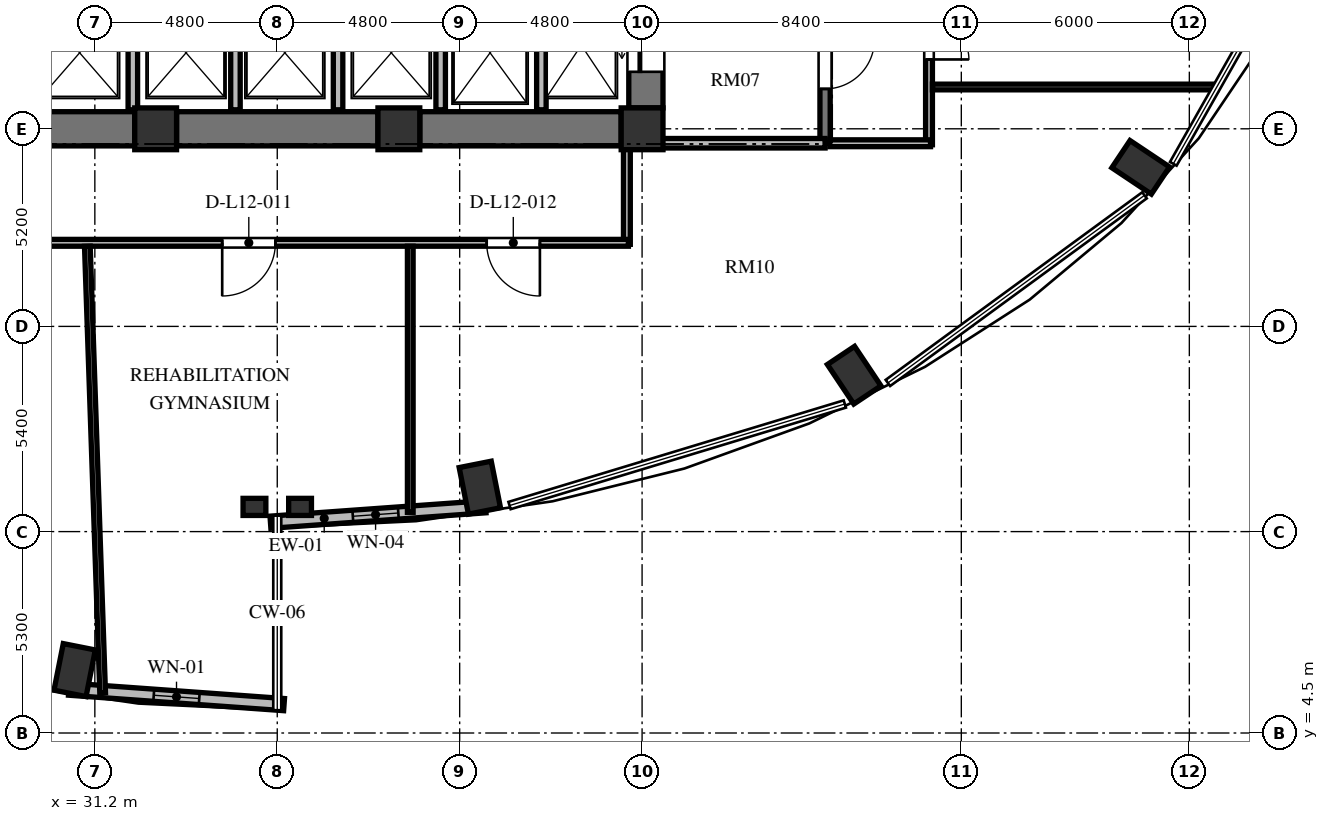
"""IFC4 building model, lengths in metres.
Left out: names, types, materials, properties, quantities, classifications, styles, units other than length and angle.
Written with IfcOpenShell. Run it as: python <this file> out.ifc"""

import sys

from ifc_helpers import new_model, si_unit, direction, frame, frame_2d, origin, origin_2d, place, context, subcontext, project, spatial, rectangle, extrude, element, fill, save


model = new_model("IFC4")
c1 = context("Model", 3, precision=1e-05, world=origin(), true_north=direction((0.0, 1.0)))
c2 = subcontext(c1, "Body", "Model", "MODEL_VIEW")
j1 = project(units=[si_unit("LENGTHUNIT", "METRE"), si_unit("PLANEANGLEUNIT", "RADIAN")], contexts=[c1])
p1 = place(None, origin())
s1 = spatial("IfcSite", under=j1, at=p1, CompositionType="ELEMENT")
p2 = place(p1, origin())
s2 = spatial("IfcBuilding", under=s1, at=p2, CompositionType="ELEMENT")
p3 = place(p2, frame((0.0, 0.0, 50.736)))
s3 = spatial("IfcBuildingStorey", under=s2, at=p3, CompositionType="ELEMENT", Elevation=50.736)
for number, where, z_axis, x_axis in (
    (1, (41.331, 10.956, 0.0), (0.0, 0.0, 1.0), (0.195, -0.981, 0.0)),
    (2, (51.181, 13.916, 0.0), (0.0, 0.0, 1.0), (0.556, -0.831, 0.0)),
    (3, (58.72, 19.386, 0.0), (0.0, 0.0, 1.0), (0.831, -0.556, 0.0)),
    (4, (30.669, 6.156, 0.0), (0.0, 0.0, 1.0), (-0.195, -0.981, 0.0)),
):
    element("IfcColumn", number, at=place(p3, frame(where, z_axis=z_axis, x_axis=x_axis)), inside=s3, PredefinedType="COLUMN", context=c2, shape_type="SweptSolid", body=[
        extrude(rectangle(XDim=1.25, YDim=0.86, at=origin_2d()), origin(), (0.0, 0.0, 1.0), 3.648),
    ])
for number, where, z_axis, x_axis in (
    (5, (32.8, 20.4, 0.0), (0.0, 0.0, 1.0), (1.0, 0.0, 0.0)),
    (6, (39.2, 20.4, 0.0), (0.0, 0.0, 1.0), (1.0, 0.0, 0.0)),
    (7, (45.6, 20.4, 0.0), (0.0, 0.0, 1.0), (1.0, 0.0, 0.0)),
):
    element("IfcColumn", number, at=place(p3, frame(where, z_axis=z_axis, x_axis=x_axis)), inside=s3, PredefinedType="COLUMN", context=c2, shape_type="SweptSolid", body=[
        extrude(rectangle(XDim=1.1, YDim=1.1, at=origin_2d()), origin(), (0.0, 0.0, 1.0), 3.648),
    ])
for number, where, z_axis, x_axis in (
    (8, (35.4, 10.45, 0.0), (0.0, 0.0, 1.0), (1.0, 0.0, 0.0)),
    (9, (36.6, 10.45, 0.0), (0.0, 0.0, 1.0), (1.0, 0.0, 0.0)),
):
    element("IfcColumn", number, at=place(p3, frame(where, z_axis=z_axis, x_axis=x_axis)), inside=s3, PredefinedType="PILASTER", context=c2, shape_type="SweptSolid", body=[
        extrude(rectangle(XDim=0.6, YDim=0.45, at=origin_2d()), origin(), (0.0, 0.0, 1.0), 3.648),
    ])
p4 = place(p3, frame((45.7, 20.95, 0.0), z_axis=(0.0, 0.0, 1.0), x_axis=(0.0, 1.0, 0.0)))
e10 = element("IfcWall", 10, at=p4, inside=s3, PredefinedType="SHEAR", context=c2, shape_type="SweptSolid", body=[
    extrude(rectangle(XDim=14.1, YDim=0.9, at=frame_2d((7.05, 0.0))), origin(), (0.0, 0.0, 1.0), 3.648),
])
p5 = place(p4, frame((11.75, 0.0, 0.0)))
e11 = element("IfcOpeningElement", 11, at=p5, cuts=e10, PredefinedType="OPENING", context=c2, shape_type="SweptSolid", body=[
    extrude(rectangle(XDim=1.4, YDim=2.3, at=frame_2d((0.7, 1.15))), frame((0.0, 0.46, 0.0), z_axis=(0.0, -1.0, 0.0), x_axis=(1.0, 0.0, 0.0)), (0.0, 0.0, 1.0), 0.92),
])
p6 = place(p4, frame((0.95, 0.0, 0.0)))
e12 = element("IfcOpeningElement", 12, at=p6, cuts=e10, PredefinedType="OPENING", context=c2, shape_type="SweptSolid", body=[
    extrude(rectangle(XDim=1.4, YDim=2.3, at=frame_2d((0.7, 1.15))), frame((0.0, 0.46, 0.0), z_axis=(0.0, -1.0, 0.0), x_axis=(1.0, 0.0, 0.0)), (0.0, 0.0, 1.0), 0.92),
])
p7 = place(p3, frame((26.95, 20.4, 0.0), z_axis=(0.0, 0.0, 1.0), x_axis=(1.0, 0.0, 0.0)))
e13 = element("IfcWall", 13, at=p7, inside=s3, PredefinedType="SHEAR", context=c2, shape_type="SweptSolid", body=[
    extrude(rectangle(XDim=5.3, YDim=0.9, at=frame_2d((2.65, 0.0))), origin(), (0.0, 0.0, 1.0), 3.648),
])
p8 = place(p3, frame((33.35, 20.4, 0.0), z_axis=(0.0, 0.0, 1.0), x_axis=(1.0, 0.0, 0.0)))
e14 = element("IfcWall", 14, at=p8, inside=s3, PredefinedType="SHEAR", context=c2, shape_type="SweptSolid", body=[
    extrude(rectangle(XDim=5.3, YDim=0.9, at=frame_2d((2.65, 0.0))), origin(), (0.0, 0.0, 1.0), 3.648),
])
p9 = place(p3, frame((39.75, 20.4, 0.0), z_axis=(0.0, 0.0, 1.0), x_axis=(1.0, 0.0, 0.0)))
e15 = element("IfcWall", 15, at=p9, inside=s3, PredefinedType="SHEAR", context=c2, shape_type="SweptSolid", body=[
    extrude(rectangle(XDim=5.3, YDim=0.9, at=frame_2d((2.65, 0.0))), origin(), (0.0, 0.0, 1.0), 3.648),
])
p10 = place(p3, frame((35.821, 10.047, 0.0), z_axis=(0.0, 0.0, 1.0), x_axis=(0.997422321809, 0.071754525696, 0.0)))
e16 = element("IfcWall", 16, at=p10, inside=s3, PredefinedType="SOLIDWALL", context=c2, shape_type="SweptSolid", body=[
    extrude(rectangle(XDim=5.675, YDim=0.32, at=frame_2d((2.838, 0.0))), origin(), (0.0, 0.0, 1.0), 3.428),
])
p11 = place(p10, frame((2.174, 0.0, 0.85)))
e17 = element("IfcOpeningElement", 17, at=p11, cuts=e16, PredefinedType="OPENING", context=c2, shape_type="SweptSolid", body=[
    extrude(rectangle(XDim=1.2, YDim=1.8, at=frame_2d((0.6, 0.9))), frame((0.0, 0.17, 0.0), z_axis=(0.0, -1.0, 0.0), x_axis=(1.0, 0.0, 0.0)), (0.0, 0.0, 1.0), 0.34),
])
p12 = place(p3, frame((30.519, 5.654, 0.0), z_axis=(0.0, 0.0, 1.0), x_axis=(0.997421878774, -0.071760683825, 0.0)))
e18 = element("IfcWall", 18, at=p12, inside=s3, PredefinedType="SOLIDWALL", context=c2, shape_type="SweptSolid", body=[
    extrude(rectangle(XDim=5.675, YDim=0.32, at=frame_2d((2.837, 0.0))), origin(), (0.0, 0.0, 1.0), 3.428),
])
p13 = place(p12, frame((2.237, 0.0, 0.85)))
e19 = element("IfcOpeningElement", 19, at=p13, cuts=e18, PredefinedType="OPENING", context=c2, shape_type="SweptSolid", body=[
    extrude(rectangle(XDim=1.2, YDim=2.2, at=frame_2d((0.6, 1.1))), frame((0.0, 0.17, 0.0), z_axis=(0.0, -1.0, 0.0), x_axis=(1.0, 0.0, 0.0)), (0.0, 0.0, 1.0), 0.34),
])
p14 = place(p3, frame((42.95, 20.9, 0.0), z_axis=(0.0, 0.0, 1.0), x_axis=(0.0, 1.0, 0.0)))
e20 = element("IfcWall", 20, at=p14, inside=s3, PredefinedType="SOLIDWALL", context=c2, shape_type="SweptSolid", body=[
    extrude(rectangle(XDim=3.2, YDim=0.25, at=frame_2d((1.6, 0.0))), origin(), (0.0, 0.0, 1.0), 3.428),
])
for number, where, z_axis, x_axis in (
    (21, (32.2, 20.9, 0.0), (0.0, 0.0, 1.0), (0.0, 1.0, 0.0)),
    (22, (34.9, 20.9, 0.0), (0.0, 0.0, 1.0), (0.0, 1.0, 0.0)),
    (23, (37.6, 20.9, 0.0), (0.0, 0.0, 1.0), (0.0, 1.0, 0.0)),
    (24, (40.3, 20.9, 0.0), (0.0, 0.0, 1.0), (0.0, 1.0, 0.0)),
):
    element("IfcWall", number, at=place(p3, frame(where, z_axis=z_axis, x_axis=x_axis)), inside=s3, PredefinedType="SOLIDWALL", context=c2, shape_type="SweptSolid", body=[
        extrude(rectangle(XDim=2.8, YDim=0.25, at=frame_2d((1.4, 0.0))), origin(), (0.0, 0.0, 1.0), 3.428),
    ])
p15 = place(p3, frame((50.415, 35.845, 0.0), z_axis=(0.0, 0.0, 1.0), x_axis=(0.0, -1.0, 0.0)))
e25 = element("IfcWall", 25, at=p15, inside=s3, PredefinedType="SHEAR", context=c2, shape_type="SweptSolid", body=[
    extrude(rectangle(XDim=15.825, YDim=0.27, at=frame_2d((7.913, 0.0))), origin(), (0.0, 0.0, 1.0), 3.648),
])
p16 = place(p15, frame((4.445, 0.0, 0.0)))
e26 = element("IfcOpeningElement", 26, at=p16, cuts=e25, PredefinedType="OPENING", context=c2, shape_type="SweptSolid", body=[
    extrude(rectangle(XDim=1.2, YDim=2.15, at=frame_2d((0.6, 1.075))), frame((0.0, 0.145, 0.0), z_axis=(0.0, -1.0, 0.0), x_axis=(1.0, 0.0, 0.0)), (0.0, 0.0, 1.0), 0.29),
])
p17 = place(p15, frame((1.295, 0.0, 0.0)))
e27 = element("IfcOpeningElement", 27, at=p17, cuts=e25, PredefinedType="OPENING", context=c2, shape_type="SweptSolid", body=[
    extrude(rectangle(XDim=1.3, YDim=2.2, at=frame_2d((0.65, 1.1))), frame((0.0, 0.145, 0.0), z_axis=(0.0, -1.0, 0.0), x_axis=(1.0, 0.0, 0.0)), (0.0, 0.0, 1.0), 0.29),
])
p18 = place(p15, frame((13.095, 0.0, 0.0)))
e28 = element("IfcOpeningElement", 28, at=p18, cuts=e25, PredefinedType="OPENING", context=c2, shape_type="SweptSolid", body=[
    extrude(rectangle(XDim=1.3, YDim=2.2, at=frame_2d((0.65, 1.1))), frame((0.0, 0.145, 0.0), z_axis=(0.0, -1.0, 0.0), x_axis=(1.0, 0.0, 0.0)), (0.0, 0.0, 1.0), 0.29),
])
p19 = place(p3, frame((45.7, 20.02, 0.0), z_axis=(0.0, 0.0, 1.0), x_axis=(1.0, 0.0, 0.0)))
e29 = element("IfcWall", 29, at=p19, inside=s3, PredefinedType="SOLIDWALL", context=c2, shape_type="SweptSolid", body=[
    extrude(rectangle(XDim=4.715, YDim=0.25, at=frame_2d((2.357, 0.0))), origin(), (0.0, 0.0, 1.0), 2.813),
])
p20 = place(p3, frame((53.15, 26.64, 0.0), z_axis=(0.0, 0.0, 1.0), x_axis=(0.0, -1.0, 0.0)))
e30 = element("IfcWall", 30, at=p20, inside=s3, PredefinedType="PARTITIONING", context=c2, shape_type="SweptSolid", body=[
    extrude(rectangle(XDim=6.66, YDim=0.18, at=frame_2d((3.33, 0.0))), origin(), (0.0, 0.0, 1.0), 3.428),
])
p21 = place(p20, frame((3.365, 0.0, 0.0)))
e31 = element("IfcOpeningElement", 31, at=p21, cuts=e30, PredefinedType="OPENING", context=c2, shape_type="SweptSolid", body=[
    extrude(rectangle(XDim=1.05, YDim=2.15, at=frame_2d((0.525, 1.075))), frame((0.0, 0.1, 0.0), z_axis=(0.0, -1.0, 0.0), x_axis=(1.0, 0.0, 0.0)), (0.0, 0.0, 1.0), 0.2),
])
p22 = place(p3, frame((53.19, 20.02, 0.0), z_axis=(0.0, 0.0, 1.0), x_axis=(-1.0, 0.0, 0.0)))
e32 = element("IfcWall", 32, at=p22, inside=s3, PredefinedType="PARTITIONING", context=c2, shape_type="SweptSolid", body=[
    extrude(rectangle(XDim=2.65, YDim=0.18, at=frame_2d((1.325, 0.0))), origin(), (0.0, 0.0, 1.0), 2.813),
])
p23 = place(p3, frame((45.2, 19.91, 0.0), z_axis=(0.0, 0.0, 1.0), x_axis=(0.0, -1.0, 0.0)))
e33 = element("IfcWall", 33, at=p23, inside=s3, PredefinedType="PARTITIONING", context=c2, shape_type="SweptSolid", body=[
    extrude(rectangle(XDim=2.55, YDim=0.18, at=frame_2d((1.275, 0.0))), origin(), (0.0, 0.0, 1.0), 3.428),
])
p24 = place(p3, frame((45.24, 17.4, 0.0), z_axis=(0.0, 0.0, 1.0), x_axis=(-1.0, 0.0, 0.0)))
e34 = element("IfcWall", 34, at=p24, inside=s3, PredefinedType="PARTITIONING", context=c2, shape_type="SweptSolid", body=[
    extrude(rectangle(XDim=21.93, YDim=0.18, at=frame_2d((10.965, 0.0))), origin(), (0.0, 0.0, 1.0), 3.053),
])
p25 = place(p24, frame((9.289, 0.0, 0.0)))
e35 = element("IfcOpeningElement", 35, at=p25, cuts=e34, PredefinedType="OPENING", context=c2, shape_type="SweptSolid", body=[
    extrude(rectangle(XDim=1.4, YDim=2.2, at=frame_2d((0.7, 1.1))), frame((0.0, 0.1, 0.0), z_axis=(0.0, -1.0, 0.0), x_axis=(1.0, 0.0, 0.0)), (0.0, 0.0, 1.0), 0.2),
])
p26 = place(p24, frame((2.329, 0.0, 0.0)))
e36 = element("IfcOpeningElement", 36, at=p26, cuts=e34, PredefinedType="OPENING", context=c2, shape_type="SweptSolid", body=[
    extrude(rectangle(XDim=1.4, YDim=2.2, at=frame_2d((0.7, 1.1))), frame((0.0, 0.1, 0.0), z_axis=(0.0, -1.0, 0.0), x_axis=(1.0, 0.0, 0.0)), (0.0, 0.0, 1.0), 0.2),
])
p27 = place(p3, frame((53.24, 21.5, 0.0), z_axis=(0.0, 0.0, 1.0), x_axis=(1.0, 0.0, 0.0)))
e37 = element("IfcWall", 37, at=p27, inside=s3, PredefinedType="PARTITIONING", context=c2, shape_type="SweptSolid", body=[
    extrude(rectangle(XDim=7.479, YDim=0.15, at=frame_2d((3.74, 0.0))), origin(), (0.0, 0.0, 1.0), 3.428),
])
p28 = place(p3, frame((31.405, 5.559, 0.0), z_axis=(0.0, 0.0, 1.0), x_axis=(-0.034219123574, 0.9994143543, 0.0)))
e38 = element("IfcWall", 38, at=p28, inside=s3, PredefinedType="PARTITIONING", context=c2, shape_type="SweptSolid", body=[
    extrude(rectangle(XDim=11.758, YDim=0.15, at=frame_2d((5.879, 0.0))), origin(), (0.0, 0.0, 1.0), 2.813),
])
p29 = place(p3, frame((39.5, 10.308, 0.0), z_axis=(0.0, 0.0, 1.0), x_axis=(0.0, 1.0, 0.0)))
e39 = element("IfcWall", 39, at=p29, inside=s3, PredefinedType="PARTITIONING", context=c2, shape_type="SweptSolid", body=[
    extrude(rectangle(XDim=7.002, YDim=0.15, at=frame_2d((3.501, 0.0))), origin(), (0.0, 0.0, 1.0), 3.428),
])
p30 = place(p11, origin())
e40 = element("IfcWindow", 40, at=p30, inside=s3, PartitioningType="SINGLE_PANEL", PredefinedType="WINDOW", context=c2, shape_type="SweptSolid", body=[
    extrude(rectangle(XDim=1.2, YDim=1.8, at=frame_2d((0.6, 0.9))), frame((0.0, 0.03, 0.0), z_axis=(0.0, -1.0, 0.0), x_axis=(1.0, 0.0, 0.0)), (0.0, 0.0, 1.0), 0.06),
])
fill(e17, e40)
p31 = place(p13, origin())
e41 = element("IfcWindow", 41, at=p31, inside=s3, PartitioningType="SINGLE_PANEL", PredefinedType="WINDOW", context=c2, shape_type="SweptSolid", body=[
    extrude(rectangle(XDim=1.2, YDim=2.2, at=frame_2d((0.6, 1.1))), frame((0.0, 0.03, 0.0), z_axis=(0.0, -1.0, 0.0), x_axis=(1.0, 0.0, 0.0)), (0.0, 0.0, 1.0), 0.06),
])
fill(e19, e41)
p32 = place(p6, origin())
e42 = element("IfcDoor", 42, at=p32, inside=s3, OperationType="SLIDING_TO_LEFT", PredefinedType="DOOR", context=c2, shape_type="SweptSolid", body=[
    extrude(rectangle(XDim=1.4, YDim=2.3, at=frame_2d((0.7, 1.15))), frame((0.0, 0.025, 0.0), z_axis=(0.0, -1.0, 0.0), x_axis=(1.0, 0.0, 0.0)), (0.0, 0.0, 1.0), 0.05),
])
fill(e12, e42)
p33 = place(p18, origin())
e43 = element("IfcDoor", 43, at=p33, inside=s3, OperationType="SINGLE_SWING_LEFT", PredefinedType="DOOR", context=c2, shape_type="SweptSolid", body=[
    extrude(rectangle(XDim=1.3, YDim=2.2, at=frame_2d((0.65, 1.1))), frame((0.0, 0.025, 0.0), z_axis=(0.0, -1.0, 0.0), x_axis=(1.0, 0.0, 0.0)), (0.0, 0.0, 1.0), 0.05),
])
fill(e28, e43)
p34 = place(p25, origin())
e44 = element("IfcDoor", 44, at=p34, inside=s3, OperationType="SINGLE_SWING_RIGHT", PredefinedType="DOOR", context=c2, shape_type="SweptSolid", body=[
    extrude(rectangle(XDim=1.4, YDim=2.2, at=frame_2d((0.7, 1.1))), frame((0.0, 0.025, 0.0), z_axis=(0.0, -1.0, 0.0), x_axis=(1.0, 0.0, 0.0)), (0.0, 0.0, 1.0), 0.05),
])
fill(e35, e44)
p35 = place(p26, origin())
e45 = element("IfcDoor", 45, at=p35, inside=s3, OperationType="SINGLE_SWING_LEFT", PredefinedType="DOOR", context=c2, shape_type="SweptSolid", body=[
    extrude(rectangle(XDim=1.4, YDim=2.2, at=frame_2d((0.7, 1.1))), frame((0.0, 0.025, 0.0), z_axis=(0.0, -1.0, 0.0), x_axis=(1.0, 0.0, 0.0)), (0.0, 0.0, 1.0), 0.05),
])
fill(e36, e45)
p36 = place(p21, origin())
e46 = element("IfcDoor", 46, at=p36, inside=s3, OperationType="SINGLE_SWING_RIGHT", PredefinedType="DOOR", context=c2, shape_type="SweptSolid", body=[
    extrude(rectangle(XDim=1.05, YDim=2.15, at=frame_2d((0.525, 1.075))), frame((0.0, 0.025, 0.0), z_axis=(0.0, -1.0, 0.0), x_axis=(1.0, 0.0, 0.0)), (0.0, 0.0, 1.0), 0.05),
])
fill(e31, e46)
save(model, sys.argv[1])
